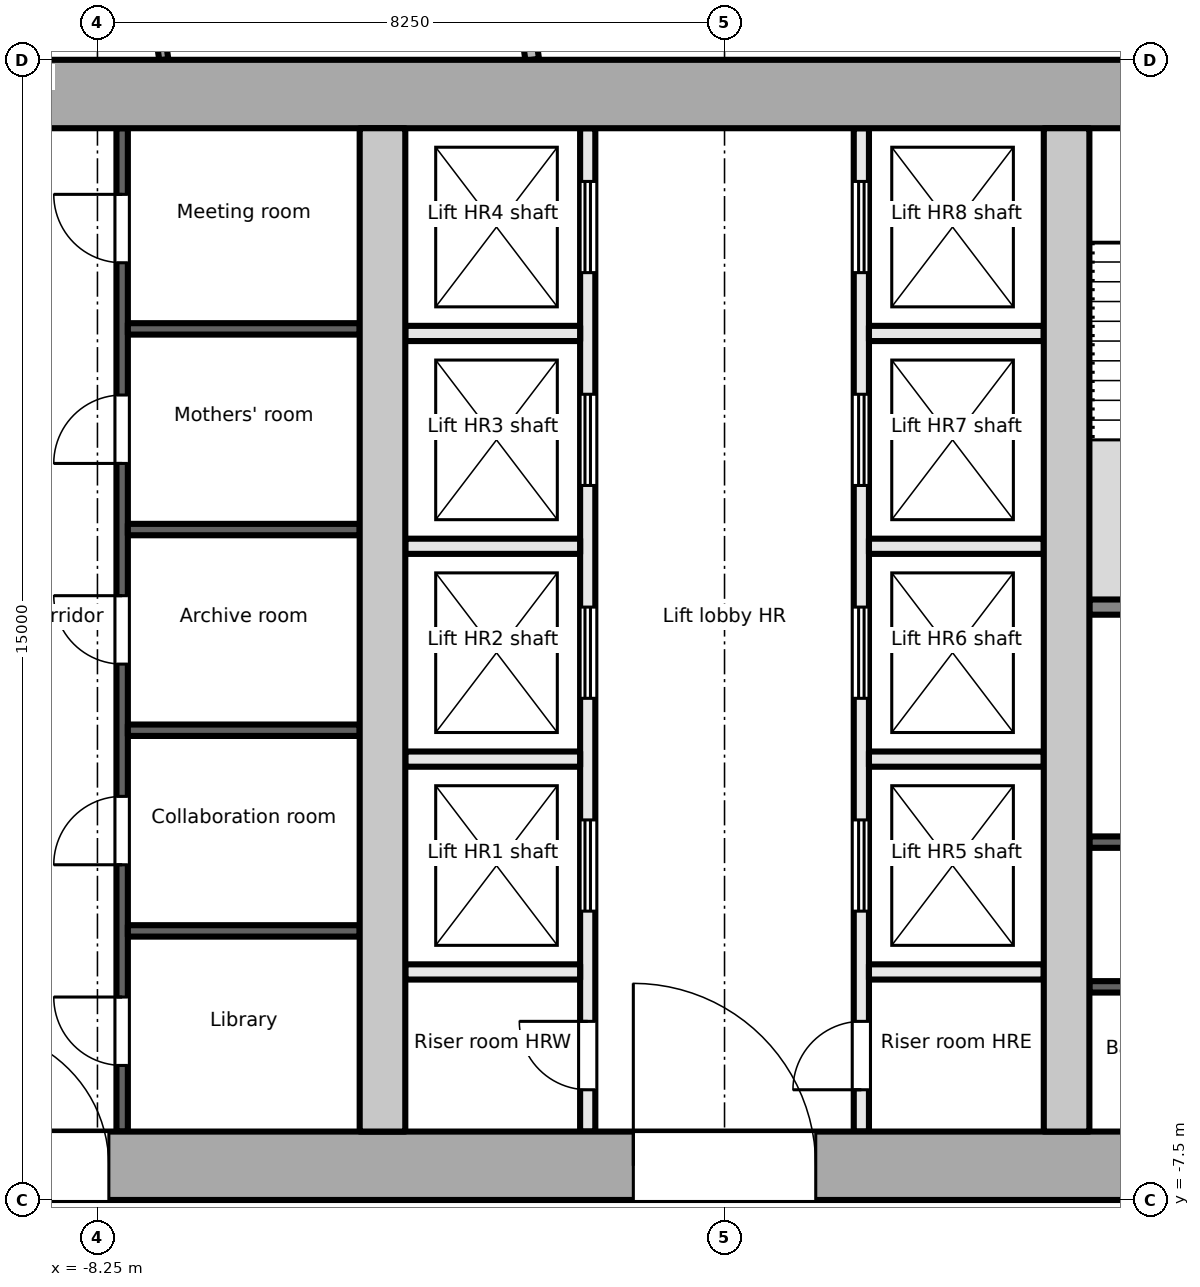
"""IFC4 building model, lengths in metres.
Left out: names, types, materials, properties, quantities, classifications, styles, units other than length and angle.
Written with IfcOpenShell. Run it as: python <this file> out.ifc"""

import sys

from ifc_helpers import new_model, si_unit, direction, frame, frame_2d, origin, place, context, subcontext, project, spatial, rectangle, extrude, element, fill, save


model = new_model("IFC4")
c1 = context("Model", 3, precision=1e-05, world=origin(), true_north=direction((0.0, 1.0)))
c2 = subcontext(c1, "Body", "Model", "MODEL_VIEW")
j1 = project(units=[si_unit("LENGTHUNIT", "METRE"), si_unit("PLANEANGLEUNIT", "RADIAN")], contexts=[c1])
p1 = place(None, origin())
s1 = spatial("IfcSite", under=j1, at=p1, CompositionType="ELEMENT")
p2 = place(p1, origin())
s2 = spatial("IfcBuilding", under=s1, at=p2, CompositionType="ELEMENT")
p3 = place(p2, frame((0.0, 0.0, 229.1)))
s3 = spatial("IfcBuildingStorey", under=s2, at=p3, CompositionType="ELEMENT", Elevation=229.1)
p4 = place(p3, frame((-18.0, -7.05, -0.2), z_axis=(0.0, 0.0, 1.0), x_axis=(1.0, 0.0, 0.0)))
e1 = element("IfcWall", 1, at=p4, inside=s3, PredefinedType="SHEAR", context=c2, shape_type="SweptSolid", body=[
    extrude(rectangle(XDim=36.0, YDim=0.9, at=frame_2d((18.0, 0.0))), origin(), (0.0, 0.0, 1.0), 3.9),
])
p5 = place(p4, frame((8.1, 0.0, 0.2)))
e2 = element("IfcOpeningElement", 2, at=p5, cuts=e1, PredefinedType="OPENING", context=c2, shape_type="SweptSolid", body=[
    extrude(rectangle(XDim=1.8, YDim=2.1, at=frame_2d((0.9, 1.05))), frame((0.0, 0.46, 0.0), z_axis=(0.0, -1.0, 0.0), x_axis=(1.0, 0.0, 0.0)), (0.0, 0.0, 1.0), 0.921),
])
p6 = place(p4, frame((16.8, 0.0, 0.2)))
e3 = element("IfcOpeningElement", 3, at=p6, cuts=e1, PredefinedType="OPENING", context=c2, shape_type="SweptSolid", body=[
    extrude(rectangle(XDim=2.4, YDim=2.1, at=frame_2d((1.2, 1.05))), frame((0.0, 0.46, 0.0), z_axis=(0.0, -1.0, 0.0), x_axis=(1.0, 0.0, 0.0)), (0.0, 0.0, 1.0), 0.921),
])
p7 = place(p4, frame((26.1, 0.0, 0.2)))
e4 = element("IfcOpeningElement", 4, at=p7, cuts=e1, PredefinedType="OPENING", context=c2, shape_type="SweptSolid", body=[
    extrude(rectangle(XDim=2.4, YDim=2.1, at=frame_2d((1.2, 1.05))), frame((0.0, 0.46, 0.0), z_axis=(0.0, -1.0, 0.0), x_axis=(1.0, 0.0, 0.0)), (0.0, 0.0, 1.0), 0.921),
])
p8 = place(p3, frame((-18.0, 7.05, -0.2), z_axis=(0.0, 0.0, 1.0), x_axis=(1.0, 0.0, 0.0)))
e5 = element("IfcWall", 5, at=p8, inside=s3, PredefinedType="SHEAR", context=c2, shape_type="SweptSolid", body=[
    extrude(rectangle(XDim=36.0, YDim=0.9, at=frame_2d((18.0, 0.0))), origin(), (0.0, 0.0, 1.0), 3.9),
])
for number, where, z_axis, x_axis in (
    (6, (-4.5, -6.6, -0.2), (0.0, 0.0, 1.0), (0.0, 1.0, 0.0)),
    (7, (4.5, -6.6, -0.2), (0.0, 0.0, 1.0), (0.0, 1.0, 0.0)),
):
    element("IfcWall", number, at=place(p3, frame(where, z_axis=z_axis, x_axis=x_axis)), inside=s3, PredefinedType="SHEAR", context=c2, shape_type="SweptSolid", body=[
        extrude(rectangle(XDim=13.2, YDim=0.6, at=frame_2d((6.6, 0.0))), origin(), (0.0, 0.0, 1.0), 3.9),
    ])
p9 = place(p3, frame((-7.925, -6.6, 0.0), z_axis=(0.0, 0.0, 1.0), x_axis=(0.0, 1.0, 0.0)))
e8 = element("IfcWall", 8, at=p9, inside=s3, PredefinedType="PARTITIONING", context=c2, shape_type="SweptSolid", body=[
    extrude(rectangle(XDim=13.2, YDim=0.15, at=frame_2d((6.6, 0.0))), origin(), (0.0, 0.0, 1.0), 3.7),
])
p10 = place(p9, frame((0.87, 0.0, 0.0)))
e9 = element("IfcOpeningElement", 9, at=p10, cuts=e8, PredefinedType="OPENING", context=c2, shape_type="SweptSolid", body=[
    extrude(rectangle(XDim=0.9, YDim=2.1, at=frame_2d((0.45, 1.05))), frame((0.0, 0.085, 0.0), z_axis=(0.0, -1.0, 0.0), x_axis=(1.0, 0.0, 0.0)), (0.0, 0.0, 1.0), 0.171),
])
p11 = place(p9, frame((3.51, 0.0, 0.0)))
e10 = element("IfcOpeningElement", 10, at=p11, cuts=e8, PredefinedType="OPENING", context=c2, shape_type="SweptSolid", body=[
    extrude(rectangle(XDim=0.9, YDim=2.1, at=frame_2d((0.45, 1.05))), frame((0.0, 0.085, 0.0), z_axis=(0.0, -1.0, 0.0), x_axis=(1.0, 0.0, 0.0)), (0.0, 0.0, 1.0), 0.171),
])
p12 = place(p9, frame((6.15, 0.0, 0.0)))
e11 = element("IfcOpeningElement", 11, at=p12, cuts=e8, PredefinedType="OPENING", context=c2, shape_type="SweptSolid", body=[
    extrude(rectangle(XDim=0.9, YDim=2.1, at=frame_2d((0.45, 1.05))), frame((0.0, 0.085, 0.0), z_axis=(0.0, -1.0, 0.0), x_axis=(1.0, 0.0, 0.0)), (0.0, 0.0, 1.0), 0.171),
])
p13 = place(p9, frame((8.79, 0.0, 0.0)))
e12 = element("IfcOpeningElement", 12, at=p13, cuts=e8, PredefinedType="OPENING", context=c2, shape_type="SweptSolid", body=[
    extrude(rectangle(XDim=0.9, YDim=2.1, at=frame_2d((0.45, 1.05))), frame((0.0, 0.085, 0.0), z_axis=(0.0, -1.0, 0.0), x_axis=(1.0, 0.0, 0.0)), (0.0, 0.0, 1.0), 0.171),
])
p14 = place(p9, frame((11.43, 0.0, 0.0)))
e13 = element("IfcOpeningElement", 13, at=p14, cuts=e8, PredefinedType="OPENING", context=c2, shape_type="SweptSolid", body=[
    extrude(rectangle(XDim=0.9, YDim=2.1, at=frame_2d((0.45, 1.05))), frame((0.0, 0.085, 0.0), z_axis=(0.0, -1.0, 0.0), x_axis=(1.0, 0.0, 0.0)), (0.0, 0.0, 1.0), 0.171),
])
for number, where, z_axis, x_axis in (
    (14, (-7.85, -3.96, 0.0), (0.0, 0.0, 1.0), (1.0, 0.0, 0.0)),
    (15, (-7.85, -1.32, 0.0), (0.0, 0.0, 1.0), (1.0, 0.0, 0.0)),
    (16, (-7.85, 1.32, 0.0), (0.0, 0.0, 1.0), (1.0, 0.0, 0.0)),
    (17, (-7.85, 3.96, 0.0), (0.0, 0.0, 1.0), (1.0, 0.0, 0.0)),
):
    element("IfcWall", number, at=place(p3, frame(where, z_axis=z_axis, x_axis=x_axis)), inside=s3, PredefinedType="PARTITIONING", context=c2, shape_type="SweptSolid", body=[
        extrude(rectangle(XDim=3.05, YDim=0.15, at=frame_2d((1.525, 0.0))), origin(), (0.0, 0.0, 1.0), 3.7),
    ])
p15 = place(p3, frame((-1.8, -6.6, 0.0), z_axis=(0.0, 0.0, 1.0), x_axis=(0.0, 1.0, 0.0)))
e18 = element("IfcWall", 18, at=p15, inside=s3, PredefinedType="PARTITIONING", context=c2, shape_type="SweptSolid", body=[
    extrude(rectangle(XDim=13.2, YDim=0.2, at=frame_2d((6.6, 0.0))), origin(), (0.0, 0.0, 1.0), 3.7),
])
p16 = place(p15, frame((0.55, 0.0, 0.0)))
e19 = element("IfcOpeningElement", 19, at=p16, cuts=e18, PredefinedType="OPENING", context=c2, shape_type="SweptSolid", body=[
    extrude(rectangle(XDim=0.9, YDim=2.1, at=frame_2d((0.45, 1.05))), frame((0.0, 0.111, 0.0), z_axis=(0.0, -1.0, 0.0), x_axis=(1.0, 0.0, 0.0)), (0.0, 0.0, 1.0), 0.221),
])
p17 = place(p15, frame((2.9, 0.0, 0.0)))
e20 = element("IfcOpeningElement", 20, at=p17, cuts=e18, PredefinedType="OPENING", context=c2, shape_type="SweptSolid", body=[
    extrude(rectangle(XDim=1.2, YDim=2.1, at=frame_2d((0.6, 1.05))), frame((0.0, 0.111, 0.0), z_axis=(0.0, -1.0, 0.0), x_axis=(1.0, 0.0, 0.0)), (0.0, 0.0, 1.0), 0.221),
])
p18 = place(p15, frame((5.7, 0.0, 0.0)))
e21 = element("IfcOpeningElement", 21, at=p18, cuts=e18, PredefinedType="OPENING", context=c2, shape_type="SweptSolid", body=[
    extrude(rectangle(XDim=1.2, YDim=2.1, at=frame_2d((0.6, 1.05))), frame((0.0, 0.111, 0.0), z_axis=(0.0, -1.0, 0.0), x_axis=(1.0, 0.0, 0.0)), (0.0, 0.0, 1.0), 0.221),
])
p19 = place(p15, frame((8.5, 0.0, 0.0)))
e22 = element("IfcOpeningElement", 22, at=p19, cuts=e18, PredefinedType="OPENING", context=c2, shape_type="SweptSolid", body=[
    extrude(rectangle(XDim=1.2, YDim=2.1, at=frame_2d((0.6, 1.05))), frame((0.0, 0.111, 0.0), z_axis=(0.0, -1.0, 0.0), x_axis=(1.0, 0.0, 0.0)), (0.0, 0.0, 1.0), 0.221),
])
p20 = place(p15, frame((11.3, 0.0, 0.0)))
e23 = element("IfcOpeningElement", 23, at=p20, cuts=e18, PredefinedType="OPENING", context=c2, shape_type="SweptSolid", body=[
    extrude(rectangle(XDim=1.2, YDim=2.1, at=frame_2d((0.6, 1.05))), frame((0.0, 0.111, 0.0), z_axis=(0.0, -1.0, 0.0), x_axis=(1.0, 0.0, 0.0)), (0.0, 0.0, 1.0), 0.221),
])
p21 = place(p3, frame((1.8, -6.6, 0.0), z_axis=(0.0, 0.0, 1.0), x_axis=(0.0, 1.0, 0.0)))
e24 = element("IfcWall", 24, at=p21, inside=s3, PredefinedType="PARTITIONING", context=c2, shape_type="SweptSolid", body=[
    extrude(rectangle(XDim=13.2, YDim=0.2, at=frame_2d((6.6, 0.0))), origin(), (0.0, 0.0, 1.0), 3.7),
])
p22 = place(p21, frame((0.55, 0.0, 0.0)))
e25 = element("IfcOpeningElement", 25, at=p22, cuts=e24, PredefinedType="OPENING", context=c2, shape_type="SweptSolid", body=[
    extrude(rectangle(XDim=0.9, YDim=2.1, at=frame_2d((0.45, 1.05))), frame((0.0, 0.111, 0.0), z_axis=(0.0, -1.0, 0.0), x_axis=(1.0, 0.0, 0.0)), (0.0, 0.0, 1.0), 0.221),
])
p23 = place(p21, frame((2.9, 0.0, 0.0)))
e26 = element("IfcOpeningElement", 26, at=p23, cuts=e24, PredefinedType="OPENING", context=c2, shape_type="SweptSolid", body=[
    extrude(rectangle(XDim=1.2, YDim=2.1, at=frame_2d((0.6, 1.05))), frame((0.0, 0.111, 0.0), z_axis=(0.0, -1.0, 0.0), x_axis=(1.0, 0.0, 0.0)), (0.0, 0.0, 1.0), 0.221),
])
p24 = place(p21, frame((5.7, 0.0, 0.0)))
e27 = element("IfcOpeningElement", 27, at=p24, cuts=e24, PredefinedType="OPENING", context=c2, shape_type="SweptSolid", body=[
    extrude(rectangle(XDim=1.2, YDim=2.1, at=frame_2d((0.6, 1.05))), frame((0.0, 0.111, 0.0), z_axis=(0.0, -1.0, 0.0), x_axis=(1.0, 0.0, 0.0)), (0.0, 0.0, 1.0), 0.221),
])
p25 = place(p21, frame((8.5, 0.0, 0.0)))
e28 = element("IfcOpeningElement", 28, at=p25, cuts=e24, PredefinedType="OPENING", context=c2, shape_type="SweptSolid", body=[
    extrude(rectangle(XDim=1.2, YDim=2.1, at=frame_2d((0.6, 1.05))), frame((0.0, 0.111, 0.0), z_axis=(0.0, -1.0, 0.0), x_axis=(1.0, 0.0, 0.0)), (0.0, 0.0, 1.0), 0.221),
])
p26 = place(p21, frame((11.3, 0.0, 0.0)))
e29 = element("IfcOpeningElement", 29, at=p26, cuts=e24, PredefinedType="OPENING", context=c2, shape_type="SweptSolid", body=[
    extrude(rectangle(XDim=1.2, YDim=2.1, at=frame_2d((0.6, 1.05))), frame((0.0, 0.111, 0.0), z_axis=(0.0, -1.0, 0.0), x_axis=(1.0, 0.0, 0.0)), (0.0, 0.0, 1.0), 0.221),
])
for number, where, z_axis, x_axis in (
    (30, (-4.2, -1.7, 0.0), (0.0, 0.0, 1.0), (1.0, 0.0, 0.0)),
    (31, (-4.2, 1.1, 0.0), (0.0, 0.0, 1.0), (1.0, 0.0, 0.0)),
    (32, (-4.2, 3.9, 0.0), (0.0, 0.0, 1.0), (1.0, 0.0, 0.0)),
    (33, (-4.2, -4.5, 0.0), (0.0, 0.0, 1.0), (1.0, 0.0, 0.0)),
    (34, (1.9, -1.7, 0.0), (0.0, 0.0, 1.0), (1.0, 0.0, 0.0)),
    (35, (1.9, 1.1, 0.0), (0.0, 0.0, 1.0), (1.0, 0.0, 0.0)),
    (36, (1.9, 3.9, 0.0), (0.0, 0.0, 1.0), (1.0, 0.0, 0.0)),
    (37, (1.9, -4.5, 0.0), (0.0, 0.0, 1.0), (1.0, 0.0, 0.0)),
):
    element("IfcWall", number, at=place(p3, frame(where, z_axis=z_axis, x_axis=x_axis)), inside=s3, PredefinedType="PARTITIONING", context=c2, shape_type="SweptSolid", body=[
        extrude(rectangle(XDim=2.3, YDim=0.2, at=frame_2d((1.15, 0.0))), origin(), (0.0, 0.0, 1.0), 3.7),
    ])
p27 = place(p3, frame((4.8, 0.3, 0.0), z_axis=(0.0, 0.0, 1.0), x_axis=(1.0, 0.0, 0.0)))
e38 = element("IfcWall", 38, at=p27, inside=s3, PredefinedType="PARTITIONING", context=c2, shape_type="SweptSolid", body=[
    extrude(rectangle(XDim=3.15, YDim=0.2, at=frame_2d((1.575, 0.0))), origin(), (0.0, 0.0, 1.0), 3.7),
])
for number, where, z_axis, x_axis in (
    (39, (4.8, -4.696, 0.0), (0.0, 0.0, 1.0), (1.0, 0.0, 0.0)),
    (40, (4.8, -2.792, 0.0), (0.0, 0.0, 1.0), (1.0, 0.0, 0.0)),
):
    element("IfcWall", number, at=place(p3, frame(where, z_axis=z_axis, x_axis=x_axis)), inside=s3, PredefinedType="PARTITIONING", context=c2, shape_type="SweptSolid", body=[
        extrude(rectangle(XDim=3.15, YDim=0.15, at=frame_2d((1.575, 0.0))), origin(), (0.0, 0.0, 1.0), 3.7),
    ])
p28 = place(p3, frame((-7.895, 11.188, 0.0), z_axis=(0.0, 0.0, 1.0), x_axis=(0.139108182039, -0.990277190331, 0.0)))
e41 = element("IfcWall", 41, at=p28, inside=s3, PredefinedType="PARTITIONING", context=c2, shape_type="SweptSolid", body=[
    extrude(rectangle(XDim=3.724, YDim=0.12, at=frame_2d((1.862, 0.0))), origin(), (0.0, 0.0, 1.0), 3.7),
])
p29 = place(p28, frame((1.412, 0.0, 0.0)))
e42 = element("IfcOpeningElement", 42, at=p29, cuts=e41, PredefinedType="OPENING", context=c2, shape_type="SweptSolid", body=[
    extrude(rectangle(XDim=0.9, YDim=2.1, at=frame_2d((0.45, 1.05))), frame((0.0, 0.071, 0.0), z_axis=(0.0, -1.0, 0.0), x_axis=(1.0, 0.0, 0.0)), (0.0, 0.0, 1.0), 0.141),
])
p30 = place(p3, frame((-2.632, 8.23, 0.0), z_axis=(0.0, 0.0, 1.0), x_axis=(0.138452925943, -0.99036901572, 0.0)))
e43 = element("IfcWall", 43, at=p30, inside=s3, PredefinedType="PARTITIONING", context=c2, shape_type="SweptSolid", body=[
    extrude(rectangle(XDim=0.737, YDim=0.18, at=frame_2d((0.369, 0.0))), origin(), (0.0, 0.0, 1.0), 3.7),
])
p31 = place(p10, origin())
e44 = element("IfcDoor", 44, at=p31, inside=s3, OperationType="SINGLE_SWING_RIGHT", PredefinedType="DOOR", context=c2, shape_type="SweptSolid", body=[
    extrude(rectangle(XDim=0.9, YDim=2.1, at=frame_2d((0.45, 1.05))), frame((0.0, 0.025, 0.0), z_axis=(0.0, -1.0, 0.0), x_axis=(1.0, 0.0, 0.0)), (0.0, 0.0, 1.0), 0.05),
])
fill(e9, e44)
p32 = place(p11, origin())
e45 = element("IfcDoor", 45, at=p32, inside=s3, OperationType="SINGLE_SWING_LEFT", PredefinedType="DOOR", context=c2, shape_type="SweptSolid", body=[
    extrude(rectangle(XDim=0.9, YDim=2.1, at=frame_2d((0.45, 1.05))), frame((0.0, 0.025, 0.0), z_axis=(0.0, -1.0, 0.0), x_axis=(1.0, 0.0, 0.0)), (0.0, 0.0, 1.0), 0.05),
])
fill(e10, e45)
p33 = place(p12, origin())
e46 = element("IfcDoor", 46, at=p33, inside=s3, OperationType="SINGLE_SWING_RIGHT", PredefinedType="DOOR", context=c2, shape_type="SweptSolid", body=[
    extrude(rectangle(XDim=0.9, YDim=2.1, at=frame_2d((0.45, 1.05))), frame((0.0, 0.025, 0.0), z_axis=(0.0, -1.0, 0.0), x_axis=(1.0, 0.0, 0.0)), (0.0, 0.0, 1.0), 0.05),
])
fill(e11, e46)
p34 = place(p13, origin())
e47 = element("IfcDoor", 47, at=p34, inside=s3, OperationType="SINGLE_SWING_LEFT", PredefinedType="DOOR", context=c2, shape_type="SweptSolid", body=[
    extrude(rectangle(XDim=0.9, YDim=2.1, at=frame_2d((0.45, 1.05))), frame((0.0, 0.025, 0.0), z_axis=(0.0, -1.0, 0.0), x_axis=(1.0, 0.0, 0.0)), (0.0, 0.0, 1.0), 0.05),
])
fill(e12, e47)
p35 = place(p14, origin())
e48 = element("IfcDoor", 48, at=p35, inside=s3, OperationType="SINGLE_SWING_RIGHT", PredefinedType="DOOR", context=c2, shape_type="SweptSolid", body=[
    extrude(rectangle(XDim=0.9, YDim=2.1, at=frame_2d((0.45, 1.05))), frame((0.0, 0.025, 0.0), z_axis=(0.0, -1.0, 0.0), x_axis=(1.0, 0.0, 0.0)), (0.0, 0.0, 1.0), 0.05),
])
fill(e13, e48)
p36 = place(p5, origin())
e49 = element("IfcDoor", 49, at=p36, inside=s3, OperationType="SINGLE_SWING_LEFT", PredefinedType="DOOR", context=c2, shape_type="SweptSolid", body=[
    extrude(rectangle(XDim=1.8, YDim=2.1, at=frame_2d((0.9, 1.05))), frame((0.0, 0.025, 0.0), z_axis=(0.0, -1.0, 0.0), x_axis=(1.0, 0.0, 0.0)), (0.0, 0.0, 1.0), 0.05),
])
fill(e2, e49)
p37 = place(p16, origin())
e50 = element("IfcDoor", 50, at=p37, inside=s3, OperationType="SINGLE_SWING_RIGHT", PredefinedType="DOOR", context=c2, shape_type="SweptSolid", body=[
    extrude(rectangle(XDim=0.9, YDim=2.1, at=frame_2d((0.45, 1.05))), frame((0.0, 0.025, 0.0), z_axis=(0.0, -1.0, 0.0), x_axis=(1.0, 0.0, 0.0)), (0.0, 0.0, 1.0), 0.05),
])
fill(e19, e50)
p38 = place(p17, origin())
e51 = element("IfcDoor", 51, at=p38, inside=s3, OperationType="DOUBLE_DOOR_SLIDING", PredefinedType="DOOR", context=c2, shape_type="SweptSolid", body=[
    extrude(rectangle(XDim=1.2, YDim=2.1, at=frame_2d((0.6, 1.05))), frame((0.0, 0.025, 0.0), z_axis=(0.0, -1.0, 0.0), x_axis=(1.0, 0.0, 0.0)), (0.0, 0.0, 1.0), 0.05),
])
fill(e20, e51)
p39 = place(p18, origin())
e52 = element("IfcDoor", 52, at=p39, inside=s3, OperationType="DOUBLE_DOOR_SLIDING", PredefinedType="DOOR", context=c2, shape_type="SweptSolid", body=[
    extrude(rectangle(XDim=1.2, YDim=2.1, at=frame_2d((0.6, 1.05))), frame((0.0, 0.025, 0.0), z_axis=(0.0, -1.0, 0.0), x_axis=(1.0, 0.0, 0.0)), (0.0, 0.0, 1.0), 0.05),
])
fill(e21, e52)
p40 = place(p19, origin())
e53 = element("IfcDoor", 53, at=p40, inside=s3, OperationType="DOUBLE_DOOR_SLIDING", PredefinedType="DOOR", context=c2, shape_type="SweptSolid", body=[
    extrude(rectangle(XDim=1.2, YDim=2.1, at=frame_2d((0.6, 1.05))), frame((0.0, 0.025, 0.0), z_axis=(0.0, -1.0, 0.0), x_axis=(1.0, 0.0, 0.0)), (0.0, 0.0, 1.0), 0.05),
])
fill(e22, e53)
p41 = place(p20, origin())
e54 = element("IfcDoor", 54, at=p41, inside=s3, OperationType="DOUBLE_DOOR_SLIDING", PredefinedType="DOOR", context=c2, shape_type="SweptSolid", body=[
    extrude(rectangle(XDim=1.2, YDim=2.1, at=frame_2d((0.6, 1.05))), frame((0.0, 0.025, 0.0), z_axis=(0.0, -1.0, 0.0), x_axis=(1.0, 0.0, 0.0)), (0.0, 0.0, 1.0), 0.05),
])
fill(e23, e54)
p42 = place(p22, origin())
e55 = element("IfcDoor", 55, at=p42, inside=s3, OperationType="SINGLE_SWING_LEFT", PredefinedType="DOOR", context=c2, shape_type="SweptSolid", body=[
    extrude(rectangle(XDim=0.9, YDim=2.1, at=frame_2d((0.45, 1.05))), frame((0.0, 0.025, 0.0), z_axis=(0.0, -1.0, 0.0), x_axis=(1.0, 0.0, 0.0)), (0.0, 0.0, 1.0), 0.05),
])
fill(e25, e55)
p43 = place(p23, origin())
e56 = element("IfcDoor", 56, at=p43, inside=s3, OperationType="DOUBLE_DOOR_SLIDING", PredefinedType="DOOR", context=c2, shape_type="SweptSolid", body=[
    extrude(rectangle(XDim=1.2, YDim=2.1, at=frame_2d((0.6, 1.05))), frame((0.0, 0.025, 0.0), z_axis=(0.0, -1.0, 0.0), x_axis=(1.0, 0.0, 0.0)), (0.0, 0.0, 1.0), 0.05),
])
fill(e26, e56)
p44 = place(p24, origin())
e57 = element("IfcDoor", 57, at=p44, inside=s3, OperationType="DOUBLE_DOOR_SLIDING", PredefinedType="DOOR", context=c2, shape_type="SweptSolid", body=[
    extrude(rectangle(XDim=1.2, YDim=2.1, at=frame_2d((0.6, 1.05))), frame((0.0, 0.025, 0.0), z_axis=(0.0, -1.0, 0.0), x_axis=(1.0, 0.0, 0.0)), (0.0, 0.0, 1.0), 0.05),
])
fill(e27, e57)
p45 = place(p25, origin())
e58 = element("IfcDoor", 58, at=p45, inside=s3, OperationType="DOUBLE_DOOR_SLIDING", PredefinedType="DOOR", context=c2, shape_type="SweptSolid", body=[
    extrude(rectangle(XDim=1.2, YDim=2.1, at=frame_2d((0.6, 1.05))), frame((0.0, 0.025, 0.0), z_axis=(0.0, -1.0, 0.0), x_axis=(1.0, 0.0, 0.0)), (0.0, 0.0, 1.0), 0.05),
])
fill(e28, e58)
p46 = place(p26, origin())
e59 = element("IfcDoor", 59, at=p46, inside=s3, OperationType="DOUBLE_DOOR_SLIDING", PredefinedType="DOOR", context=c2, shape_type="SweptSolid", body=[
    extrude(rectangle(XDim=1.2, YDim=2.1, at=frame_2d((0.6, 1.05))), frame((0.0, 0.025, 0.0), z_axis=(0.0, -1.0, 0.0), x_axis=(1.0, 0.0, 0.0)), (0.0, 0.0, 1.0), 0.05),
])
fill(e29, e59)
p47 = place(p6, origin())
e60 = element("IfcDoor", 60, at=p47, inside=s3, OperationType="DOUBLE_DOOR_DOUBLE_SWING", PredefinedType="DOOR", context=c2, shape_type="SweptSolid", body=[
    extrude(rectangle(XDim=2.4, YDim=2.1, at=frame_2d((1.2, 1.05))), frame((0.0, 0.025, 0.0), z_axis=(0.0, -1.0, 0.0), x_axis=(1.0, 0.0, 0.0)), (0.0, 0.0, 1.0), 0.05),
])
fill(e3, e60)
save(model, sys.argv[1])
